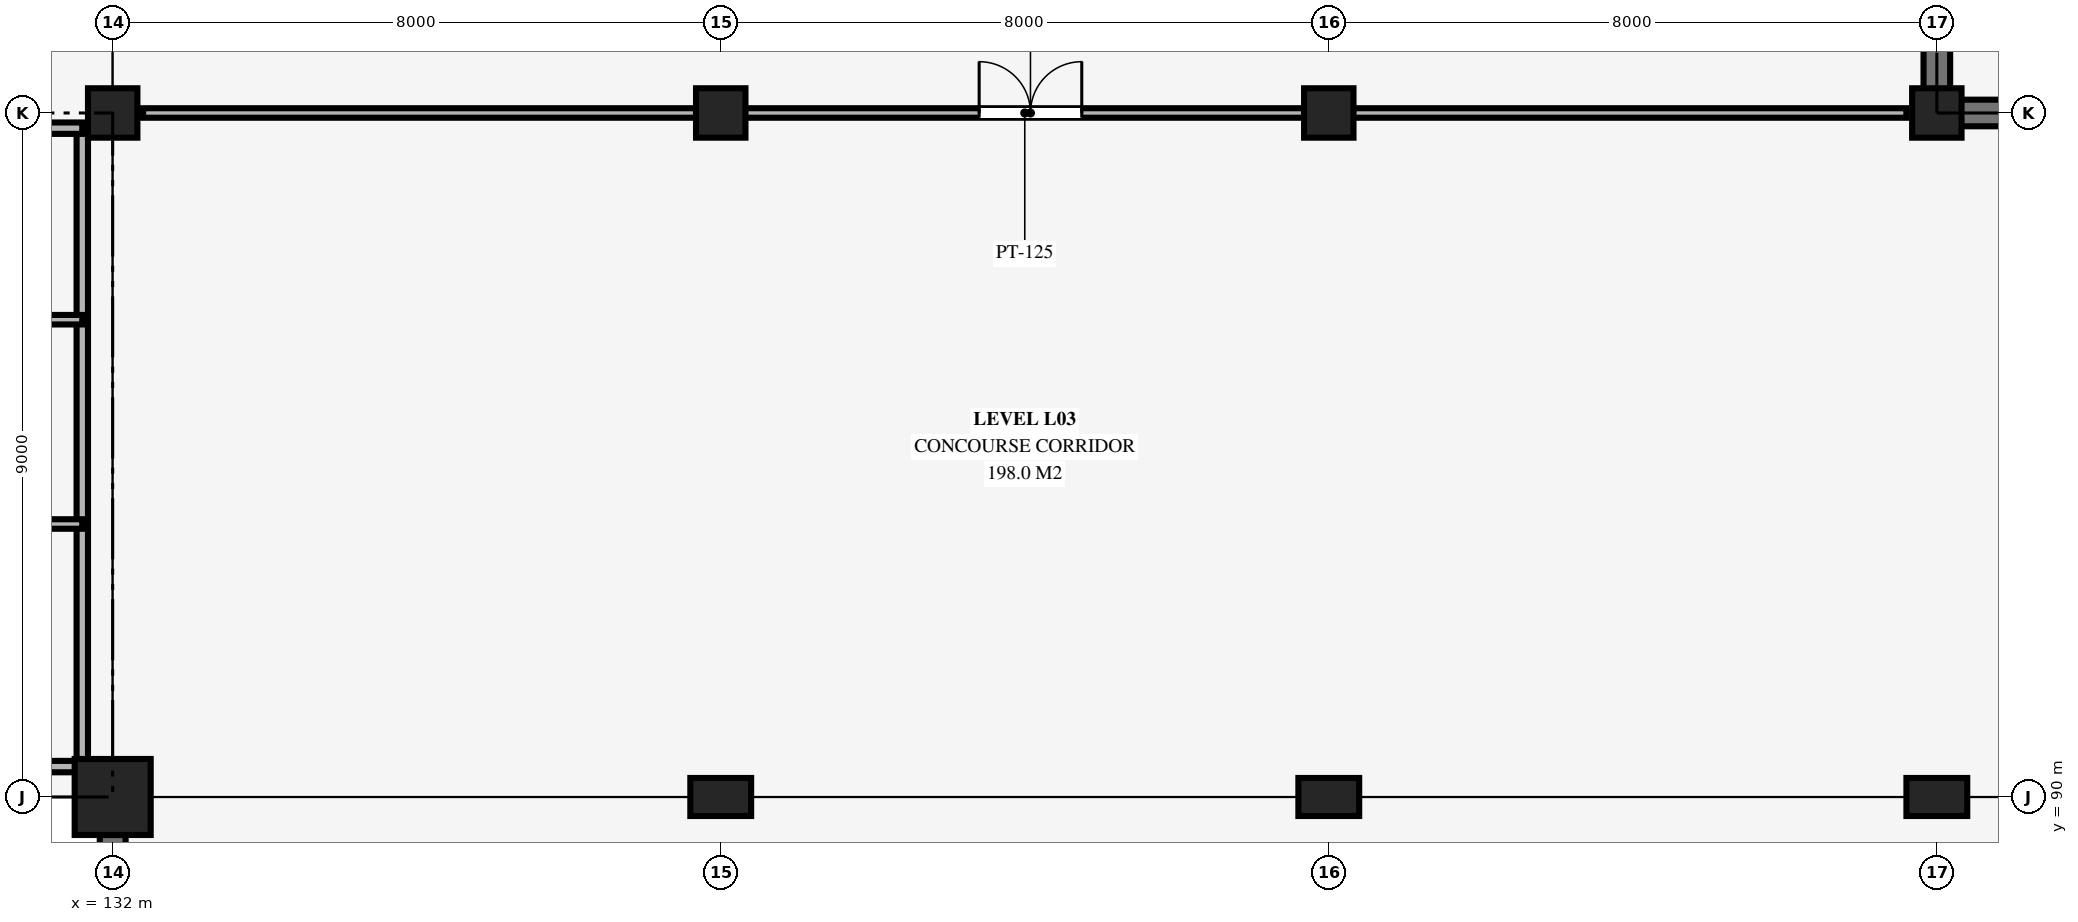
"""IFC4 building model, lengths in metres.
Left out: names, types, materials, properties, quantities, classifications, styles, units other than length and angle.
Written with IfcOpenShell. Run it as: python <this file> out.ifc"""

import sys

from ifc_helpers import new_model, si_unit, direction, frame, frame_2d, origin, origin_2d, place, context, subcontext, project, spatial, rectangle, extrude, element, fill, save


model = new_model("IFC4")
c1 = context("Model", 3, precision=1e-05, world=origin(), true_north=direction((0.0, 1.0)))
c2 = subcontext(c1, "Body", "Model", "MODEL_VIEW")
j1 = project(units=[si_unit("LENGTHUNIT", "METRE"), si_unit("PLANEANGLEUNIT", "RADIAN")], contexts=[c1])
p1 = place(None, origin())
s1 = spatial("IfcSite", under=j1, at=p1, CompositionType="ELEMENT")
p2 = place(p1, origin())
s2 = spatial("IfcBuilding", under=s1, at=p2, CompositionType="ELEMENT")
p3 = place(p2, frame((0.0, 0.0, 15.0)))
s3 = spatial("IfcBuildingStorey", under=s2, at=p3, CompositionType="ELEMENT", Elevation=15.0)
p4 = place(p3, frame((132.0, 90.0, 0.0), z_axis=(0.0, 0.0, 1.0), x_axis=(1.0, 0.0, 0.0)))
e1 = element("IfcColumn", 1, at=p4, inside=s3, PredefinedType="COLUMN", context=c2, shape_type="SweptSolid", body=[
    extrude(rectangle(XDim=1.0, YDim=1.0, at=origin_2d()), origin(), (0.0, 0.0, 1.0), 4.34),
])
p5 = place(p3, frame((132.0, 99.0, 0.0), z_axis=(0.0, 0.0, 1.0), x_axis=(1.0, 0.0, 0.0)))
e2 = element("IfcColumn", 2, at=p5, inside=s3, PredefinedType="COLUMN", context=c2, shape_type="SweptSolid", body=[
    extrude(rectangle(XDim=0.65, YDim=0.65, at=origin_2d()), origin(), (0.0, 0.0, 1.0), 4.34),
])
p6 = place(p3, frame((140.0, 90.0, 0.0), z_axis=(0.0, 0.0, 1.0), x_axis=(0.0, 1.0, 0.0)))
e3 = element("IfcColumn", 3, at=p6, inside=s3, PredefinedType="PILASTER", context=c2, shape_type="SweptSolid", body=[
    extrude(rectangle(XDim=0.5, YDim=0.8, at=origin_2d()), origin(), (0.0, 0.0, 1.0), 4.34),
])
p7 = place(p3, frame((140.0, 99.0, 0.0), z_axis=(0.0, 0.0, 1.0), x_axis=(1.0, 0.0, 0.0)))
e4 = element("IfcColumn", 4, at=p7, inside=s3, PredefinedType="COLUMN", context=c2, shape_type="SweptSolid", body=[
    extrude(rectangle(XDim=0.65, YDim=0.65, at=origin_2d()), origin(), (0.0, 0.0, 1.0), 4.34),
])
p8 = place(p3, frame((148.0, 90.0, 0.0), z_axis=(0.0, 0.0, 1.0), x_axis=(0.0, 1.0, 0.0)))
e5 = element("IfcColumn", 5, at=p8, inside=s3, PredefinedType="PILASTER", context=c2, shape_type="SweptSolid", body=[
    extrude(rectangle(XDim=0.5, YDim=0.8, at=origin_2d()), origin(), (0.0, 0.0, 1.0), 4.34),
])
p9 = place(p3, frame((148.0, 99.0, 0.0), z_axis=(0.0, 0.0, 1.0), x_axis=(1.0, 0.0, 0.0)))
e6 = element("IfcColumn", 6, at=p9, inside=s3, PredefinedType="COLUMN", context=c2, shape_type="SweptSolid", body=[
    extrude(rectangle(XDim=0.65, YDim=0.65, at=origin_2d()), origin(), (0.0, 0.0, 1.0), 4.34),
])
p10 = place(p3, frame((156.0, 90.0, 0.0), z_axis=(0.0, 0.0, 1.0), x_axis=(0.0, 1.0, 0.0)))
e7 = element("IfcColumn", 7, at=p10, inside=s3, PredefinedType="PILASTER", context=c2, shape_type="SweptSolid", body=[
    extrude(rectangle(XDim=0.5, YDim=0.8, at=origin_2d()), origin(), (0.0, 0.0, 1.0), 4.34),
])
p11 = place(p3, frame((156.0, 99.0, 0.0), z_axis=(0.0, 0.0, 1.0), x_axis=(1.0, 0.0, 0.0)))
e8 = element("IfcColumn", 8, at=p11, inside=s3, PredefinedType="COLUMN", context=c2, shape_type="SweptSolid", body=[
    extrude(rectangle(XDim=0.65, YDim=0.65, at=origin_2d()), origin(), (0.0, 0.0, 1.0), 4.34),
])
p12 = place(p3, frame((132.0, 89.5, 0.0), z_axis=(0.0, 0.0, 1.0), x_axis=(0.0, -1.0, 0.0)))
e9 = element("IfcWall", 9, at=p12, inside=s3, PredefinedType="SOLIDWALL", context=c2, shape_type="SweptSolid", body=[
    extrude(rectangle(XDim=11.2, YDim=0.34, at=frame_2d((5.6, 0.0))), origin(), (0.0, 0.0, 1.0), 4.24),
])
p13 = place(p12, frame((4.4, 0.0, 1.0)))
e10 = element("IfcOpeningElement", 10, at=p13, cuts=e9, PredefinedType="OPENING", context=c2, shape_type="SweptSolid", body=[
    extrude(rectangle(XDim=2.4, YDim=1.8, at=frame_2d((1.2, 0.9))), frame((0.0, 0.18, 0.0), z_axis=(0.0, -1.0, 0.0), x_axis=(1.0, 0.0, 0.0)), (0.0, 0.0, 1.0), 0.36),
])
p14 = place(p3, frame((156.0, 99.0, 0.0), z_axis=(0.0, 0.0, 1.0), x_axis=(1.0, 0.0, 0.0)))
e11 = element("IfcWall", 11, at=p14, inside=s3, PredefinedType="SHEAR", context=c2, shape_type="SweptSolid", body=[
    extrude(rectangle(XDim=8.0, YDim=0.35, at=frame_2d((4.0, 0.0))), origin(), (0.0, 0.0, 1.0), 4.48),
])
p15 = place(p3, frame((156.0, 99.0, 0.0), z_axis=(0.0, 0.0, 1.0), x_axis=(0.0, 1.0, 0.0)))
e12 = element("IfcWall", 12, at=p15, inside=s3, PredefinedType="SHEAR", context=c2, shape_type="SweptSolid", body=[
    extrude(rectangle(XDim=9.0, YDim=0.35, at=frame_2d((4.5, 0.0))), origin(), (0.0, 0.0, 1.0), 4.48),
])
p16 = place(p3, frame((131.6, 90.4, 0.0), z_axis=(0.0, 0.0, 1.0), x_axis=(0.0, 1.0, 0.0)))
e13 = element("IfcWall", 13, at=p16, inside=s3, PredefinedType="PARTITIONING", context=c2, shape_type="SweptSolid", body=[
    extrude(rectangle(XDim=8.4, YDim=0.15, at=frame_2d((4.2, 0.0))), origin(), (0.0, 0.0, 1.0), 3.45),
])
for number, where, z_axis, x_axis in (
    (14, (122.6, 98.8, 0.0), (0.0, 0.0, 1.0), (1.0, 0.0, 0.0)),
    (15, (122.6, 90.4, 0.0), (0.0, 0.0, 1.0), (1.0, 0.0, 0.0)),
):
    element("IfcWall", number, at=place(p3, frame(where, z_axis=z_axis, x_axis=x_axis)), inside=s3, PredefinedType="PARTITIONING", context=c2, shape_type="SweptSolid", body=[
        extrude(rectangle(XDim=9.0, YDim=0.15, at=frame_2d((4.5, 0.0))), origin(), (0.0, 0.0, 1.0), 3.45),
    ])
for number, where, z_axis, x_axis in (
    (16, (122.6, 93.592, 0.0), (0.0, 0.0, 1.0), (1.0, 0.0, 0.0)),
    (17, (122.6, 96.28, 0.0), (0.0, 0.0, 1.0), (1.0, 0.0, 0.0)),
):
    element("IfcWall", number, at=place(p3, frame(where, z_axis=z_axis, x_axis=x_axis)), inside=s3, PredefinedType="PARTITIONING", context=c2, shape_type="SweptSolid", body=[
        extrude(rectangle(XDim=9.0, YDim=0.125, at=frame_2d((4.5, 0.0))), origin(), (0.0, 0.0, 1.0), 3.45),
    ])
p17 = place(p3, frame((132.4, 99.0, 0.0), z_axis=(0.0, 0.0, 1.0), x_axis=(1.0, 0.0, 0.0)))
e18 = element("IfcWall", 18, at=p17, inside=s3, PredefinedType="PARTITIONING", context=c2, shape_type="SweptSolid", body=[
    extrude(rectangle(XDim=23.2, YDim=0.125, at=frame_2d((11.6, 0.0))), origin(), (0.0, 0.0, 1.0), 3.45),
])
p18 = place(p17, frame((11.0, 0.0, 0.0)))
e19 = element("IfcOpeningElement", 19, at=p18, cuts=e18, PredefinedType="OPENING", context=c2, shape_type="SweptSolid", body=[
    extrude(rectangle(XDim=1.35, YDim=2.15, at=frame_2d((0.675, 1.075))), frame((0.0, 0.073, 0.0), z_axis=(0.0, -1.0, 0.0), x_axis=(1.0, 0.0, 0.0)), (0.0, 0.0, 1.0), 0.145),
])
p19 = place(p18, origin())
e20 = element("IfcDoor", 20, at=p19, inside=s3, OperationType="DOUBLE_DOOR_SINGLE_SWING", PredefinedType="DOOR", context=c2, shape_type="SweptSolid", body=[
    extrude(rectangle(XDim=1.35, YDim=2.15, at=frame_2d((0.675, 1.075))), frame((0.0, 0.025, 0.0), z_axis=(0.0, -1.0, 0.0), x_axis=(1.0, 0.0, 0.0)), (0.0, 0.0, 1.0), 0.05),
])
fill(e19, e20)
save(model, sys.argv[1])
